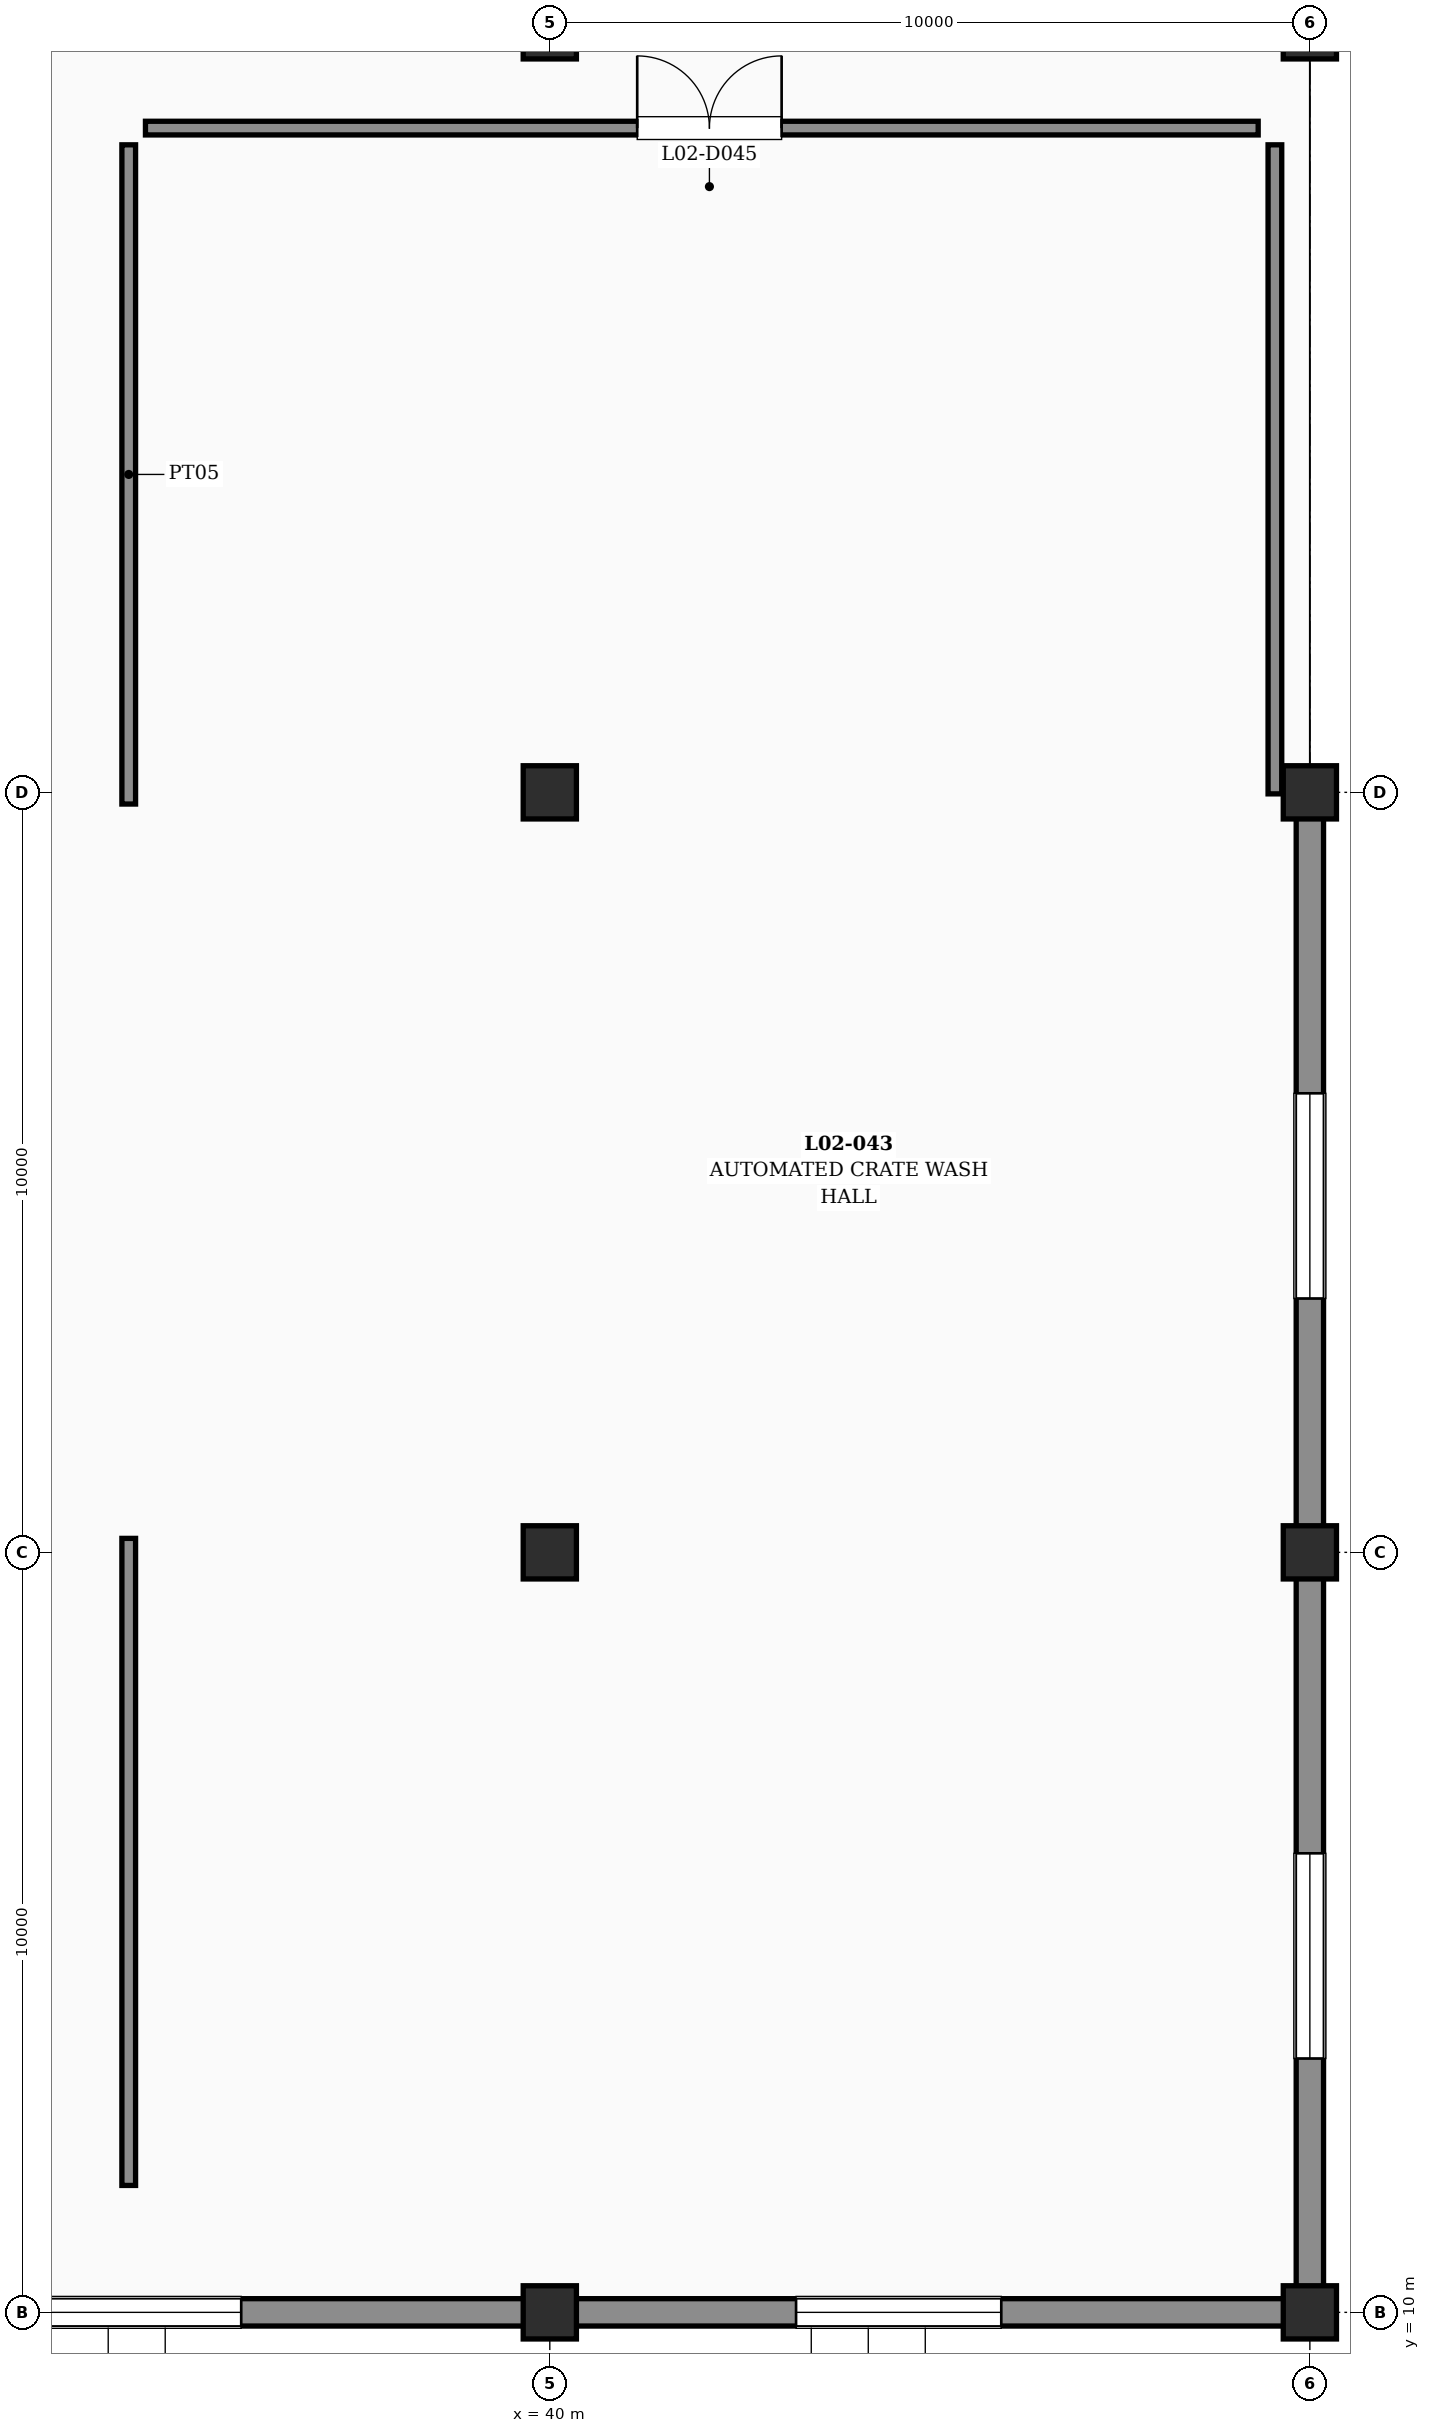
"""IFC4 building model, lengths in metres.
Left out: names, types, materials, properties, quantities, classifications, styles, units other than length and angle.
Written with IfcOpenShell. Run it as: python <this file> out.ifc"""

import sys

from ifc_helpers import new_model, si_unit, direction, frame, frame_2d, origin, origin_2d, place, context, subcontext, project, spatial, rectangle, extrude, element, fill, save


model = new_model("IFC4")
c1 = context("Model", 3, precision=1e-05, world=origin(), true_north=direction((0.0, 1.0)))
c2 = subcontext(c1, "Body", "Model", "MODEL_VIEW")
j1 = project(units=[si_unit("LENGTHUNIT", "METRE"), si_unit("PLANEANGLEUNIT", "RADIAN")], contexts=[c1])
p1 = place(None, origin())
s1 = spatial("IfcSite", under=j1, at=p1, CompositionType="ELEMENT")
p2 = place(p1, origin())
s2 = spatial("IfcBuilding", under=s1, at=p2, CompositionType="ELEMENT")
p3 = place(p2, frame((0.0, 0.0, 10.8)))
s3 = spatial("IfcBuildingStorey", under=s2, at=p3, CompositionType="ELEMENT", Elevation=10.8)
for number, where, z_axis, x_axis in (
    (1, (40.0, 10.0, 0.0), (0.0, 0.0, 1.0), (1.0, 0.0, 0.0)),
    (2, (40.0, 20.0, 0.0), (0.0, 0.0, 1.0), (1.0, 0.0, 0.0)),
    (3, (40.0, 30.0, 0.0), (0.0, 0.0, 1.0), (1.0, 0.0, 0.0)),
    (4, (40.0, 40.0, 0.0), (0.0, 0.0, 1.0), (1.0, 0.0, 0.0)),
    (5, (50.0, 10.0, 0.0), (0.0, 0.0, 1.0), (1.0, 0.0, 0.0)),
    (6, (50.0, 20.0, 0.0), (0.0, 0.0, 1.0), (1.0, 0.0, 0.0)),
    (7, (50.0, 30.0, 0.0), (0.0, 0.0, 1.0), (1.0, 0.0, 0.0)),
    (8, (50.0, 40.0, 0.0), (0.0, 0.0, 1.0), (1.0, 0.0, 0.0)),
):
    element("IfcColumn", number, at=place(p3, frame(where, z_axis=z_axis, x_axis=x_axis)), inside=s3, PredefinedType="COLUMN", context=c2, shape_type="SweptSolid", body=[
        extrude(rectangle(XDim=0.7, YDim=0.7, at=origin_2d()), origin(), (0.0, 0.0, 1.0), 4.2),
    ])
p4 = place(p3, frame((50.0, 10.24, 0.0), z_axis=(0.0, 0.0, 1.0), x_axis=(0.0, 1.0, 0.0)))
e9 = element("IfcWall", 9, at=p4, inside=s3, PredefinedType="SOLIDWALL", context=c2, shape_type="SweptSolid", body=[
    extrude(rectangle(XDim=9.52, YDim=0.36, at=frame_2d((4.76, 0.0))), origin(), (0.0, 0.0, 1.0), 3.08),
])
p5 = place(p4, frame((3.1, 0.0, 1.3)))
e10 = element("IfcOpeningElement", 10, at=p5, cuts=e9, PredefinedType="OPENING", context=c2, shape_type="SweptSolid", body=[
    extrude(rectangle(XDim=2.7, YDim=1.4, at=frame_2d((1.35, 0.7))), frame((0.0, 0.19, 0.0), z_axis=(0.0, -1.0, 0.0), x_axis=(1.0, 0.0, 0.0)), (0.0, 0.0, 1.0), 0.38),
])
p6 = place(p3, frame((50.0, 20.24, 0.0), z_axis=(0.0, 0.0, 1.0), x_axis=(0.0, 1.0, 0.0)))
e11 = element("IfcWall", 11, at=p6, inside=s3, PredefinedType="SOLIDWALL", context=c2, shape_type="SweptSolid", body=[
    extrude(rectangle(XDim=9.52, YDim=0.36, at=frame_2d((4.76, 0.0))), origin(), (0.0, 0.0, 1.0), 3.08),
])
p7 = place(p6, frame((3.1, 0.0, 1.3)))
e12 = element("IfcOpeningElement", 12, at=p7, cuts=e11, PredefinedType="OPENING", context=c2, shape_type="SweptSolid", body=[
    extrude(rectangle(XDim=2.7, YDim=1.4, at=frame_2d((1.35, 0.7))), frame((0.0, 0.19, 0.0), z_axis=(0.0, -1.0, 0.0), x_axis=(1.0, 0.0, 0.0)), (0.0, 0.0, 1.0), 0.38),
])
p8 = place(p3, frame((30.24, 10.0, 0.0), z_axis=(0.0, 0.0, 1.0), x_axis=(1.0, 0.0, 0.0)))
e13 = element("IfcWall", 13, at=p8, inside=s3, PredefinedType="SOLIDWALL", context=c2, shape_type="SweptSolid", body=[
    extrude(rectangle(XDim=9.52, YDim=0.36, at=frame_2d((4.76, 0.0))), origin(), (0.0, 0.0, 1.0), 3.23),
])
p9 = place(p8, frame((3.0, 0.0, 1.25)))
e14 = element("IfcOpeningElement", 14, at=p9, cuts=e13, PredefinedType="OPENING", context=c2, shape_type="SweptSolid", body=[
    extrude(rectangle(XDim=2.7, YDim=1.4, at=frame_2d((1.35, 0.7))), frame((0.0, 0.19, 0.0), z_axis=(0.0, -1.0, 0.0), x_axis=(1.0, 0.0, 0.0)), (0.0, 0.0, 1.0), 0.38),
])
p10 = place(p3, frame((40.24, 10.0, 0.0), z_axis=(0.0, 0.0, 1.0), x_axis=(1.0, 0.0, 0.0)))
e15 = element("IfcWall", 15, at=p10, inside=s3, PredefinedType="SOLIDWALL", context=c2, shape_type="SweptSolid", body=[
    extrude(rectangle(XDim=9.52, YDim=0.36, at=frame_2d((4.76, 0.0))), origin(), (0.0, 0.0, 1.0), 3.23),
])
p11 = place(p10, frame((3.0, 0.0, 1.25)))
e16 = element("IfcOpeningElement", 16, at=p11, cuts=e15, PredefinedType="OPENING", context=c2, shape_type="SweptSolid", body=[
    extrude(rectangle(XDim=2.7, YDim=1.4, at=frame_2d((1.35, 0.7))), frame((0.0, 0.19, 0.0), z_axis=(0.0, -1.0, 0.0), x_axis=(1.0, 0.0, 0.0)), (0.0, 0.0, 1.0), 0.38),
])
p12 = place(p3, frame((34.46, 11.67, 0.0), z_axis=(0.0, 0.0, 1.0), x_axis=(0.0, 1.0, 0.0)))
e17 = element("IfcWall", 17, at=p12, inside=s3, PredefinedType="PARTITIONING", context=c2, shape_type="SweptSolid", body=[
    extrude(rectangle(XDim=8.514, YDim=0.18, at=frame_2d((4.257, 0.0))), origin(), (0.0, 0.0, 1.0), 3.23),
])
p13 = place(p3, frame((34.46, 29.846, 0.0), z_axis=(0.0, 0.0, 1.0), x_axis=(0.0, 1.0, 0.0)))
e18 = element("IfcWall", 18, at=p13, inside=s3, PredefinedType="PARTITIONING", context=c2, shape_type="SweptSolid", body=[
    extrude(rectangle(XDim=8.674, YDim=0.18, at=frame_2d((4.337, 0.0))), origin(), (0.0, 0.0, 1.0), 3.92),
])
p14 = place(p3, frame((34.68, 38.74, 0.0), z_axis=(0.0, 0.0, 1.0), x_axis=(1.0, 0.0, 0.0)))
e19 = element("IfcWall", 19, at=p14, inside=s3, PredefinedType="PARTITIONING", context=c2, shape_type="SweptSolid", body=[
    extrude(rectangle(XDim=14.64, YDim=0.18, at=frame_2d((7.32, 0.0))), origin(), (0.0, 0.0, 1.0), 3.23),
])
p15 = place(p14, frame((6.47, 0.0, 0.0)))
e20 = element("IfcOpeningElement", 20, at=p15, cuts=e19, PredefinedType="OPENING", context=c2, shape_type="SweptSolid", body=[
    extrude(rectangle(XDim=1.9, YDim=2.3, at=frame_2d((0.95, 1.15))), frame((0.0, 0.1, 0.0), z_axis=(0.0, -1.0, 0.0), x_axis=(1.0, 0.0, 0.0)), (0.0, 0.0, 1.0), 0.2),
])
p16 = place(p3, frame((49.54, 38.52, 0.0), z_axis=(0.0, 0.0, 1.0), x_axis=(0.0, -1.0, 0.0)))
e21 = element("IfcWall", 21, at=p16, inside=s3, PredefinedType="PARTITIONING", context=c2, shape_type="SweptSolid", body=[
    extrude(rectangle(XDim=8.54, YDim=0.18, at=frame_2d((4.27, 0.0))), origin(), (0.0, 0.0, 1.0), 3.92),
])
p17 = place(p5, origin())
e22 = element("IfcWindow", 22, at=p17, inside=s3, PartitioningType="SINGLE_PANEL", PredefinedType="WINDOW", context=c2, shape_type="SweptSolid", body=[
    extrude(rectangle(XDim=2.7, YDim=1.4, at=frame_2d((1.35, 0.7))), frame((0.0, 0.03, 0.0), z_axis=(0.0, -1.0, 0.0), x_axis=(1.0, 0.0, 0.0)), (0.0, 0.0, 1.0), 0.06),
])
fill(e10, e22)
p18 = place(p7, origin())
e23 = element("IfcWindow", 23, at=p18, inside=s3, PartitioningType="SINGLE_PANEL", PredefinedType="WINDOW", context=c2, shape_type="SweptSolid", body=[
    extrude(rectangle(XDim=2.7, YDim=1.4, at=frame_2d((1.35, 0.7))), frame((0.0, 0.03, 0.0), z_axis=(0.0, -1.0, 0.0), x_axis=(1.0, 0.0, 0.0)), (0.0, 0.0, 1.0), 0.06),
])
fill(e12, e23)
p19 = place(p9, origin())
e24 = element("IfcWindow", 24, at=p19, inside=s3, PartitioningType="SINGLE_PANEL", PredefinedType="WINDOW", context=c2, shape_type="SweptSolid", body=[
    extrude(rectangle(XDim=2.7, YDim=1.4, at=frame_2d((1.35, 0.7))), frame((0.0, 0.03, 0.0), z_axis=(0.0, -1.0, 0.0), x_axis=(1.0, 0.0, 0.0)), (0.0, 0.0, 1.0), 0.06),
])
fill(e14, e24)
p20 = place(p11, origin())
e25 = element("IfcWindow", 25, at=p20, inside=s3, PartitioningType="SINGLE_PANEL", PredefinedType="WINDOW", context=c2, shape_type="SweptSolid", body=[
    extrude(rectangle(XDim=2.7, YDim=1.4, at=frame_2d((1.35, 0.7))), frame((0.0, 0.03, 0.0), z_axis=(0.0, -1.0, 0.0), x_axis=(1.0, 0.0, 0.0)), (0.0, 0.0, 1.0), 0.06),
])
fill(e16, e25)
p21 = place(p15, origin())
e26 = element("IfcDoor", 26, at=p21, inside=s3, OperationType="DOUBLE_DOOR_SINGLE_SWING", PredefinedType="DOOR", context=c2, shape_type="SweptSolid", body=[
    extrude(rectangle(XDim=1.9, YDim=2.3, at=frame_2d((0.95, 1.15))), frame((0.0, 0.025, 0.0), z_axis=(0.0, -1.0, 0.0), x_axis=(1.0, 0.0, 0.0)), (0.0, 0.0, 1.0), 0.05),
])
fill(e20, e26)
save(model, sys.argv[1])
